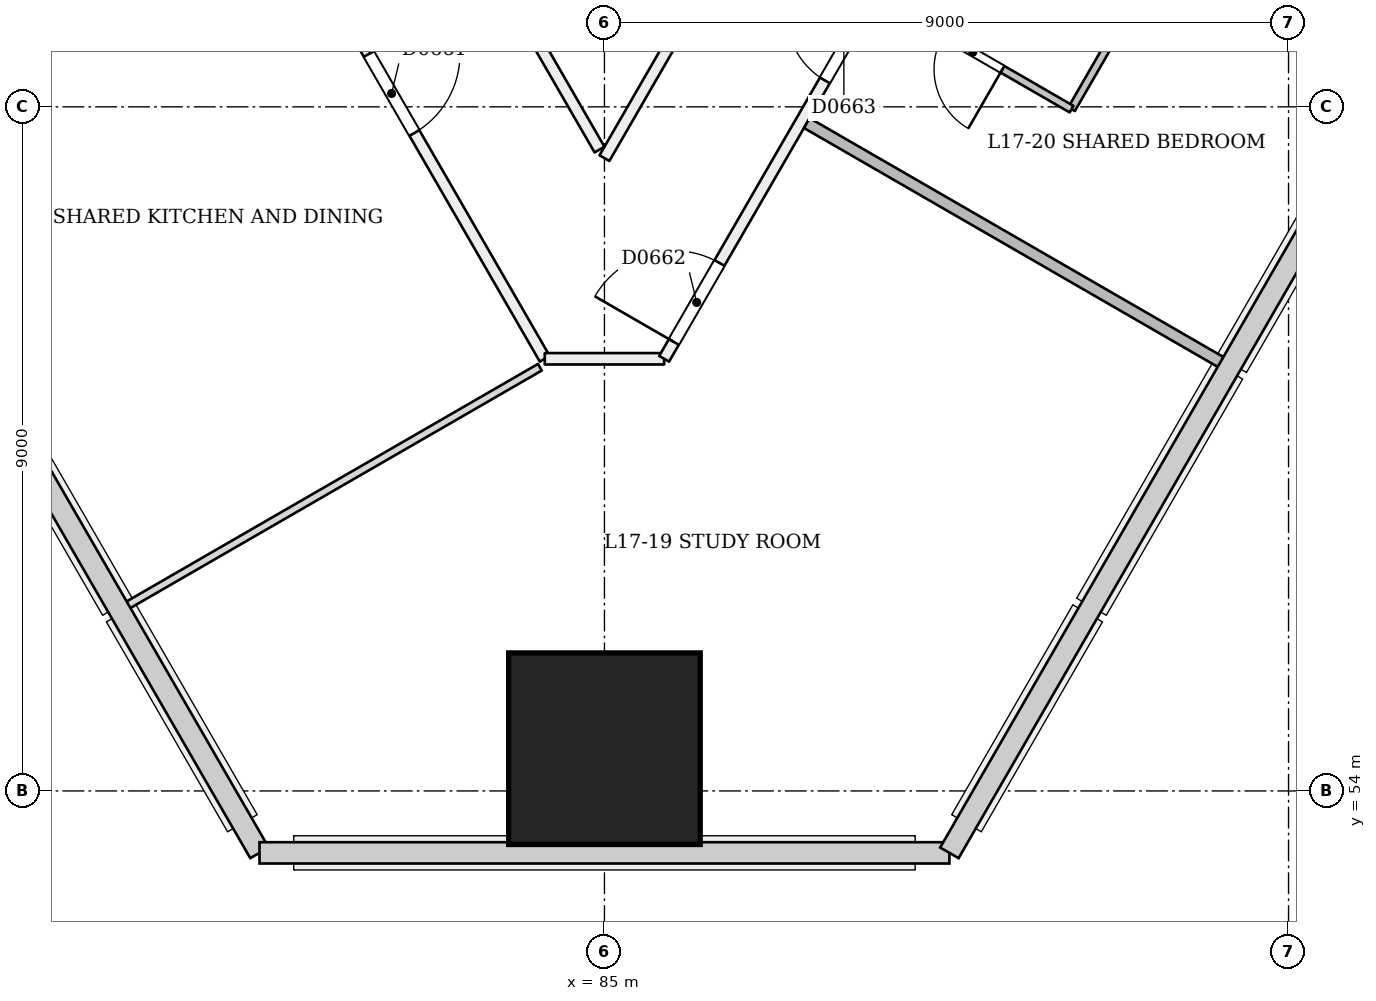
"""IFC4 building model, lengths in metres.
Left out: names, types, materials, properties, quantities, classifications, styles, units other than length and angle.
Written with IfcOpenShell. Run it as: python <this file> out.ifc"""

import sys

from ifc_helpers import new_model, si_unit, direction, frame, frame_2d, origin, origin_2d, place, context, subcontext, project, spatial, rectangle, extrude, element, fill, save


model = new_model("IFC4")
c1 = context("Model", 3, precision=1e-05, world=origin(), true_north=direction((0.0, 1.0)))
c2 = subcontext(c1, "Body", "Model", "MODEL_VIEW")
j1 = project(units=[si_unit("LENGTHUNIT", "METRE"), si_unit("PLANEANGLEUNIT", "RADIAN")], contexts=[c1])
p1 = place(None, origin())
s1 = spatial("IfcSite", under=j1, at=p1, CompositionType="ELEMENT")
p2 = place(p1, origin())
s2 = spatial("IfcBuilding", under=s1, at=p2, CompositionType="ELEMENT")
p3 = place(p2, frame((0.0, 0.0, 70.2)))
s3 = spatial("IfcBuildingStorey", under=s2, at=p3, CompositionType="ELEMENT", Elevation=70.2)
p4 = place(p3, frame((85.0, 54.485, 0.0), z_axis=(0.0, 0.058356907999, 0.998295783467), x_axis=(-1.0, 0.0, 0.0)))
e1 = element("IfcColumn", 1, at=p4, inside=s3, PredefinedType="COLUMN", context=c2, shape_type="SweptSolid", body=[
    extrude(rectangle(XDim=2.52, YDim=2.52, at=origin_2d()), origin(), (0.0, 0.0, 1.0), 3.606),
])
p5 = place(p3, frame((62.59, 97.14, 0.0), z_axis=(0.0, 0.0, 1.0), x_axis=(0.500002288388, -0.866024082579, 0.0)))
e2 = element("IfcWall", 2, at=p5, inside=s3, PredefinedType="PARTITIONING", context=c2, shape_type="SweptSolid", body=[
    extrude(rectangle(XDim=43.248, YDim=0.15, at=frame_2d((21.624, 0.0))), origin(), (0.0, 0.0, 1.0), 2.7),
])
p6 = place(p5, frame((1.28, 0.0, 0.0)))
e3 = element("IfcOpeningElement", 3, at=p6, cuts=e2, PredefinedType="OPENING", context=c2, shape_type="SweptSolid", body=[
    extrude(rectangle(XDim=1.0, YDim=2.1, at=frame_2d((0.5, 1.05))), frame((0.0, 0.085, 0.0), z_axis=(0.0, -1.0, 0.0), x_axis=(1.0, 0.0, 0.0)), (0.0, 0.0, 1.0), 0.171),
])
p7 = place(p5, frame((4.195, 0.0, 0.0)))
e4 = element("IfcOpeningElement", 4, at=p7, cuts=e2, PredefinedType="OPENING", context=c2, shape_type="SweptSolid", body=[
    extrude(rectangle(XDim=1.1, YDim=2.1, at=frame_2d((0.55, 1.05))), frame((0.0, 0.085, 0.0), z_axis=(0.0, -1.0, 0.0), x_axis=(1.0, 0.0, 0.0)), (0.0, 0.0, 1.0), 0.171),
])
p8 = place(p5, frame((10.904, 0.0, 0.0)))
e5 = element("IfcOpeningElement", 5, at=p8, cuts=e2, PredefinedType="OPENING", context=c2, shape_type="SweptSolid", body=[
    extrude(rectangle(XDim=1.0, YDim=2.1, at=frame_2d((0.5, 1.05))), frame((0.0, 0.085, 0.0), z_axis=(0.0, -1.0, 0.0), x_axis=(1.0, 0.0, 0.0)), (0.0, 0.0, 1.0), 0.171),
])
p9 = place(p5, frame((17.624, 0.0, 0.0)))
e6 = element("IfcOpeningElement", 6, at=p9, cuts=e2, PredefinedType="OPENING", context=c2, shape_type="SweptSolid", body=[
    extrude(rectangle(XDim=1.2, YDim=2.1, at=frame_2d((0.6, 1.05))), frame((0.0, 0.085, 0.0), z_axis=(0.0, -1.0, 0.0), x_axis=(1.0, 0.0, 0.0)), (0.0, 0.0, 1.0), 0.171),
])
p10 = place(p5, frame((22.229, 0.0, 0.0)))
e7 = element("IfcOpeningElement", 7, at=p10, cuts=e2, PredefinedType="OPENING", context=c2, shape_type="SweptSolid", body=[
    extrude(rectangle(XDim=1.0, YDim=2.1, at=frame_2d((0.5, 1.05))), frame((0.0, 0.085, 0.0), z_axis=(0.0, -1.0, 0.0), x_axis=(1.0, 0.0, 0.0)), (0.0, 0.0, 1.0), 0.171),
])
p11 = place(p5, frame((28.904, 0.0, 0.0)))
e8 = element("IfcOpeningElement", 8, at=p11, cuts=e2, PredefinedType="OPENING", context=c2, shape_type="SweptSolid", body=[
    extrude(rectangle(XDim=1.0, YDim=2.1, at=frame_2d((0.5, 1.05))), frame((0.0, 0.085, 0.0), z_axis=(0.0, -1.0, 0.0), x_axis=(1.0, 0.0, 0.0)), (0.0, 0.0, 1.0), 0.171),
])
p12 = place(p5, frame((32.374, 0.0, 0.0)))
e9 = element("IfcOpeningElement", 9, at=p12, cuts=e2, PredefinedType="OPENING", context=c2, shape_type="SweptSolid", body=[
    extrude(rectangle(XDim=1.0, YDim=2.1, at=frame_2d((0.5, 1.05))), frame((0.0, 0.085, 0.0), z_axis=(0.0, -1.0, 0.0), x_axis=(1.0, 0.0, 0.0)), (0.0, 0.0, 1.0), 0.171),
])
p13 = place(p5, frame((38.618, 0.0, 0.0)))
e10 = element("IfcOpeningElement", 10, at=p13, cuts=e2, PredefinedType="OPENING", context=c2, shape_type="SweptSolid", body=[
    extrude(rectangle(XDim=1.2, YDim=2.1, at=frame_2d((0.6, 1.05))), frame((0.0, 0.085, 0.0), z_axis=(0.0, -1.0, 0.0), x_axis=(1.0, 0.0, 0.0)), (0.0, 0.0, 1.0), 0.171),
])
p14 = place(p3, frame((84.215, 59.686, 0.0), z_axis=(0.0, 0.0, 1.0), x_axis=(1.0, 0.0, 0.0)))
e11 = element("IfcWall", 11, at=p14, inside=s3, PredefinedType="PARTITIONING", context=c2, shape_type="SweptSolid", body=[
    extrude(rectangle(XDim=1.571, YDim=0.15, at=frame_2d((0.785, 0.0))), origin(), (0.0, 0.0, 1.0), 3.1),
])
p15 = place(p3, frame((85.785, 59.686, 0.0), z_axis=(0.0, 0.0, 1.0), x_axis=(0.500002288388, 0.866024082579, 0.0)))
e12 = element("IfcWall", 12, at=p15, inside=s3, PredefinedType="PARTITIONING", context=c2, shape_type="SweptSolid", body=[
    extrude(rectangle(XDim=43.248, YDim=0.15, at=frame_2d((21.624, 0.0))), origin(), (0.0, 0.0, 1.0), 2.7),
])
p16 = place(p15, frame((0.256, 0.0, 0.0)))
e13 = element("IfcOpeningElement", 13, at=p16, cuts=e12, PredefinedType="OPENING", context=c2, shape_type="SweptSolid", body=[
    extrude(rectangle(XDim=1.2, YDim=2.1, at=frame_2d((0.6, 1.05))), frame((0.0, 0.085, 0.0), z_axis=(0.0, -1.0, 0.0), x_axis=(1.0, 0.0, 0.0)), (0.0, 0.0, 1.0), 0.171),
])
p17 = place(p15, frame((4.229, 0.0, 0.0)))
e14 = element("IfcOpeningElement", 14, at=p17, cuts=e12, PredefinedType="OPENING", context=c2, shape_type="SweptSolid", body=[
    extrude(rectangle(XDim=1.0, YDim=2.1, at=frame_2d((0.5, 1.05))), frame((0.0, 0.085, 0.0), z_axis=(0.0, -1.0, 0.0), x_axis=(1.0, 0.0, 0.0)), (0.0, 0.0, 1.0), 0.171),
])
p18 = place(p15, frame((10.904, 0.0, 0.0)))
e15 = element("IfcOpeningElement", 15, at=p18, cuts=e12, PredefinedType="OPENING", context=c2, shape_type="SweptSolid", body=[
    extrude(rectangle(XDim=1.0, YDim=2.1, at=frame_2d((0.5, 1.05))), frame((0.0, 0.085, 0.0), z_axis=(0.0, -1.0, 0.0), x_axis=(1.0, 0.0, 0.0)), (0.0, 0.0, 1.0), 0.171),
])
p19 = place(p15, frame((13.345, 0.0, 0.0)))
e16 = element("IfcOpeningElement", 16, at=p19, cuts=e12, PredefinedType="OPENING", context=c2, shape_type="SweptSolid", body=[
    extrude(rectangle(XDim=1.0, YDim=2.1, at=frame_2d((0.5, 1.05))), frame((0.0, 0.085, 0.0), z_axis=(0.0, -1.0, 0.0), x_axis=(1.0, 0.0, 0.0)), (0.0, 0.0, 1.0), 0.171),
])
p20 = place(p15, frame((21.024, 0.0, 0.0)))
e17 = element("IfcOpeningElement", 17, at=p20, cuts=e12, PredefinedType="OPENING", context=c2, shape_type="SweptSolid", body=[
    extrude(rectangle(XDim=1.2, YDim=2.1, at=frame_2d((0.6, 1.05))), frame((0.0, 0.085, 0.0), z_axis=(0.0, -1.0, 0.0), x_axis=(1.0, 0.0, 0.0)), (0.0, 0.0, 1.0), 0.171),
])
p21 = place(p15, frame((28.904, 0.0, 0.0)))
e18 = element("IfcOpeningElement", 18, at=p21, cuts=e12, PredefinedType="OPENING", context=c2, shape_type="SweptSolid", body=[
    extrude(rectangle(XDim=1.0, YDim=2.1, at=frame_2d((0.5, 1.05))), frame((0.0, 0.085, 0.0), z_axis=(0.0, -1.0, 0.0), x_axis=(1.0, 0.0, 0.0)), (0.0, 0.0, 1.0), 0.171),
])
p22 = place(p15, frame((31.195, 0.0, 0.0)))
e19 = element("IfcOpeningElement", 19, at=p22, cuts=e12, PredefinedType="OPENING", context=c2, shape_type="SweptSolid", body=[
    extrude(rectangle(XDim=1.1, YDim=2.1, at=frame_2d((0.55, 1.05))), frame((0.0, 0.085, 0.0), z_axis=(0.0, -1.0, 0.0), x_axis=(1.0, 0.0, 0.0)), (0.0, 0.0, 1.0), 0.171),
])
p23 = place(p15, frame((38.618, 0.0, 0.0)))
e20 = element("IfcOpeningElement", 20, at=p23, cuts=e12, PredefinedType="OPENING", context=c2, shape_type="SweptSolid", body=[
    extrude(rectangle(XDim=1.2, YDim=2.1, at=frame_2d((0.6, 1.05))), frame((0.0, 0.085, 0.0), z_axis=(0.0, -1.0, 0.0), x_axis=(1.0, 0.0, 0.0)), (0.0, 0.0, 1.0), 0.171),
])
p24 = place(p3, frame((101.209, 90.4, 0.0), z_axis=(0.0, 0.0, 1.0), x_axis=(-0.500001034453, -0.866024806542, 0.0)))
e21 = element("IfcWall", 21, at=p24, inside=s3, PredefinedType="PARTITIONING", context=c2, shape_type="SweptSolid", body=[
    extrude(rectangle(XDim=32.418, YDim=0.15, at=frame_2d((16.209, 0.0))), origin(), (0.0, 0.0, 1.0), 3.1),
])
p25 = place(p24, frame((6.612, 0.0, 0.0)))
e22 = element("IfcOpeningElement", 22, at=p25, cuts=e21, PredefinedType="OPENING", context=c2, shape_type="SweptSolid", body=[
    extrude(rectangle(XDim=1.2, YDim=2.1, at=frame_2d((0.6, 1.05))), frame((0.0, 0.085, 0.0), z_axis=(0.0, -1.0, 0.0), x_axis=(1.0, 0.0, 0.0)), (0.0, 0.0, 1.0), 0.171),
])
p26 = place(p24, frame((15.296, 0.0, 0.0)))
e23 = element("IfcOpeningElement", 23, at=p26, cuts=e21, PredefinedType="OPENING", context=c2, shape_type="SweptSolid", body=[
    extrude(rectangle(XDim=1.2, YDim=2.1, at=frame_2d((0.6, 1.05))), frame((0.0, 0.085, 0.0), z_axis=(0.0, -1.0, 0.0), x_axis=(1.0, 0.0, 0.0)), (0.0, 0.0, 1.0), 0.171),
])
p27 = place(p24, frame((25.157, 0.0, 0.0)))
e24 = element("IfcOpeningElement", 24, at=p27, cuts=e21, PredefinedType="OPENING", context=c2, shape_type="SweptSolid", body=[
    extrude(rectangle(XDim=1.2, YDim=2.1, at=frame_2d((0.6, 1.05))), frame((0.0, 0.085, 0.0), z_axis=(0.0, -1.0, 0.0), x_axis=(1.0, 0.0, 0.0)), (0.0, 0.0, 1.0), 0.171),
])
p28 = place(p3, frame((84.935, 62.438, 0.0), z_axis=(0.0, 0.0, 1.0), x_axis=(-0.499998663172, 0.866026175601, 0.0)))
e25 = element("IfcWall", 25, at=p28, inside=s3, PredefinedType="PARTITIONING", context=c2, shape_type="SweptSolid", body=[
    extrude(rectangle(XDim=32.288, YDim=0.15, at=frame_2d((16.144, 0.0))), origin(), (0.0, 0.0, 1.0), 3.1),
])
p29 = place(p28, frame((18.241, 0.0, 0.0)))
e26 = element("IfcOpeningElement", 26, at=p29, cuts=e25, PredefinedType="OPENING", context=c2, shape_type="SweptSolid", body=[
    extrude(rectangle(XDim=1.2, YDim=2.1, at=frame_2d((0.6, 1.05))), frame((0.0, 0.085, 0.0), z_axis=(0.0, -1.0, 0.0), x_axis=(1.0, 0.0, 0.0)), (0.0, 0.0, 1.0), 0.171),
])
p30 = place(p28, frame((25.591, 0.0, 0.0)))
e27 = element("IfcOpeningElement", 27, at=p30, cuts=e25, PredefinedType="OPENING", context=c2, shape_type="SweptSolid", body=[
    extrude(rectangle(XDim=1.2, YDim=2.1, at=frame_2d((0.6, 1.05))), frame((0.0, 0.085, 0.0), z_axis=(0.0, -1.0, 0.0), x_axis=(1.0, 0.0, 0.0)), (0.0, 0.0, 1.0), 0.171),
])
p31 = place(p28, frame((13.545, 0.0, 0.0)))
e28 = element("IfcOpeningElement", 28, at=p31, cuts=e25, PredefinedType="OPENING", context=c2, shape_type="SweptSolid", body=[
    extrude(rectangle(XDim=1.2, YDim=2.1, at=frame_2d((0.6, 1.05))), frame((0.0, 0.085, 0.0), z_axis=(0.0, -1.0, 0.0), x_axis=(1.0, 0.0, 0.0)), (0.0, 0.0, 1.0), 0.171),
])
p32 = place(p3, frame((74.61, 63.521, 0.0), z_axis=(0.0, 0.0, 1.0), x_axis=(0.866042250622, 0.499970819286, 0.0)))
e29 = element("IfcWall", 29, at=p32, inside=s3, PredefinedType="PARTITIONING", context=c2, shape_type="SweptSolid", body=[
    extrude(rectangle(XDim=6.325, YDim=0.1, at=frame_2d((3.163, 0.0))), origin(), (0.0, 0.0, 1.0), 2.6),
])
p33 = place(p3, frame((78.687, 56.42, 0.0), z_axis=(0.0, 0.0, 1.0), x_axis=(0.866017388547, 0.500013882542, 0.0)))
e30 = element("IfcWall", 30, at=p33, inside=s3, PredefinedType="PARTITIONING", context=c2, shape_type="SweptSolid", body=[
    extrude(rectangle(XDim=6.309, YDim=0.1, at=frame_2d((3.154, 0.0))), origin(), (0.0, 0.0, 1.0), 2.6),
])
p34 = place(p3, frame((93.157, 59.614, 0.0), z_axis=(0.0, 0.0, 1.0), x_axis=(-0.866025401434, 0.500000004071, 0.0)))
e31 = element("IfcWall", 31, at=p34, inside=s3, PredefinedType="PARTITIONING", context=c2, shape_type="SweptSolid", body=[
    extrude(rectangle(XDim=6.345, YDim=0.15, at=frame_2d((3.173, 0.0))), origin(), (0.0, 0.0, 1.0), 2.6),
])
p35 = place(p3, frame((92.408, 65.156, 0.0), z_axis=(0.0, 0.0, 1.0), x_axis=(-0.499976333282, -0.866039067339, 0.0)))
e32 = element("IfcWall", 32, at=p35, inside=s3, PredefinedType="PARTITIONING", context=c2, shape_type="SweptSolid", body=[
    extrude(rectangle(XDim=2.525, YDim=0.1, at=frame_2d((1.262, 0.0))), origin(), (0.0, 0.0, 1.0), 2.7),
])
p36 = place(p3, frame((91.146, 62.969, 0.0), z_axis=(0.0, 0.0, 1.0), x_axis=(-0.865989585315, 0.500062034277, 0.0)))
e33 = element("IfcWall", 33, at=p36, inside=s3, PredefinedType="PARTITIONING", context=c2, shape_type="SweptSolid", body=[
    extrude(rectangle(XDim=2.925, YDim=0.1, at=frame_2d((1.462, 0.0))), origin(), (0.0, 0.0, 1.0), 3.1),
])
p37 = place(p36, frame((1.05, 0.0, 0.0)))
e34 = element("IfcOpeningElement", 34, at=p37, cuts=e33, PredefinedType="OPENING", context=c2, shape_type="SweptSolid", body=[
    extrude(rectangle(XDim=0.9, YDim=2.1, at=frame_2d((0.45, 1.05))), frame((0.0, 0.061, 0.0), z_axis=(0.0, -1.0, 0.0), x_axis=(1.0, 0.0, 0.0)), (0.0, 0.0, 1.0), 0.121),
])
p38 = place(p3, frame((95.39, 63.521, 0.0), z_axis=(0.0, 0.0, 1.0), x_axis=(-0.866038183914, 0.499977863513, 0.0)))
e35 = element("IfcWall", 35, at=p38, inside=s3, PredefinedType="PARTITIONING", context=c2, shape_type="SweptSolid", body=[
    extrude(rectangle(XDim=3.42, YDim=0.15, at=frame_2d((1.71, 0.0))), origin(), (0.0, 0.0, 1.0), 2.6),
])
p39 = place(p13, origin())
e36 = element("IfcDoor", 36, at=p39, inside=s3, OperationType="SINGLE_SWING_LEFT", PredefinedType="NOTDEFINED", context=c2, shape_type="SweptSolid", body=[
    extrude(rectangle(XDim=1.2, YDim=2.1, at=frame_2d((0.6, 1.05))), frame((0.0, 0.025, 0.0), z_axis=(0.0, -1.0, 0.0), x_axis=(1.0, 0.0, 0.0)), (0.0, 0.0, 1.0), 0.05),
])
fill(e10, e36)
p40 = place(p16, origin())
e37 = element("IfcDoor", 37, at=p40, inside=s3, OperationType="SINGLE_SWING_LEFT", PredefinedType="NOTDEFINED", context=c2, shape_type="SweptSolid", body=[
    extrude(rectangle(XDim=1.2, YDim=2.1, at=frame_2d((0.6, 1.05))), frame((0.0, 0.025, 0.0), z_axis=(0.0, -1.0, 0.0), x_axis=(1.0, 0.0, 0.0)), (0.0, 0.0, 1.0), 0.05),
])
fill(e13, e37)
p41 = place(p17, origin())
e38 = element("IfcDoor", 38, at=p41, inside=s3, OperationType="SINGLE_SWING_RIGHT", PredefinedType="NOTDEFINED", context=c2, shape_type="SweptSolid", body=[
    extrude(rectangle(XDim=1.0, YDim=2.1, at=frame_2d((0.5, 1.05))), frame((0.0, 0.025, 0.0), z_axis=(0.0, -1.0, 0.0), x_axis=(1.0, 0.0, 0.0)), (0.0, 0.0, 1.0), 0.05),
])
fill(e14, e38)
p42 = place(p37, origin())
e39 = element("IfcDoor", 39, at=p42, inside=s3, OperationType="SINGLE_SWING_LEFT", PredefinedType="NOTDEFINED", context=c2, shape_type="SweptSolid", body=[
    extrude(rectangle(XDim=0.9, YDim=2.1, at=frame_2d((0.45, 1.05))), frame((0.0, 0.025, 0.0), z_axis=(0.0, -1.0, 0.0), x_axis=(1.0, 0.0, 0.0)), (0.0, 0.0, 1.0), 0.05),
])
fill(e34, e39)
save(model, sys.argv[1])
